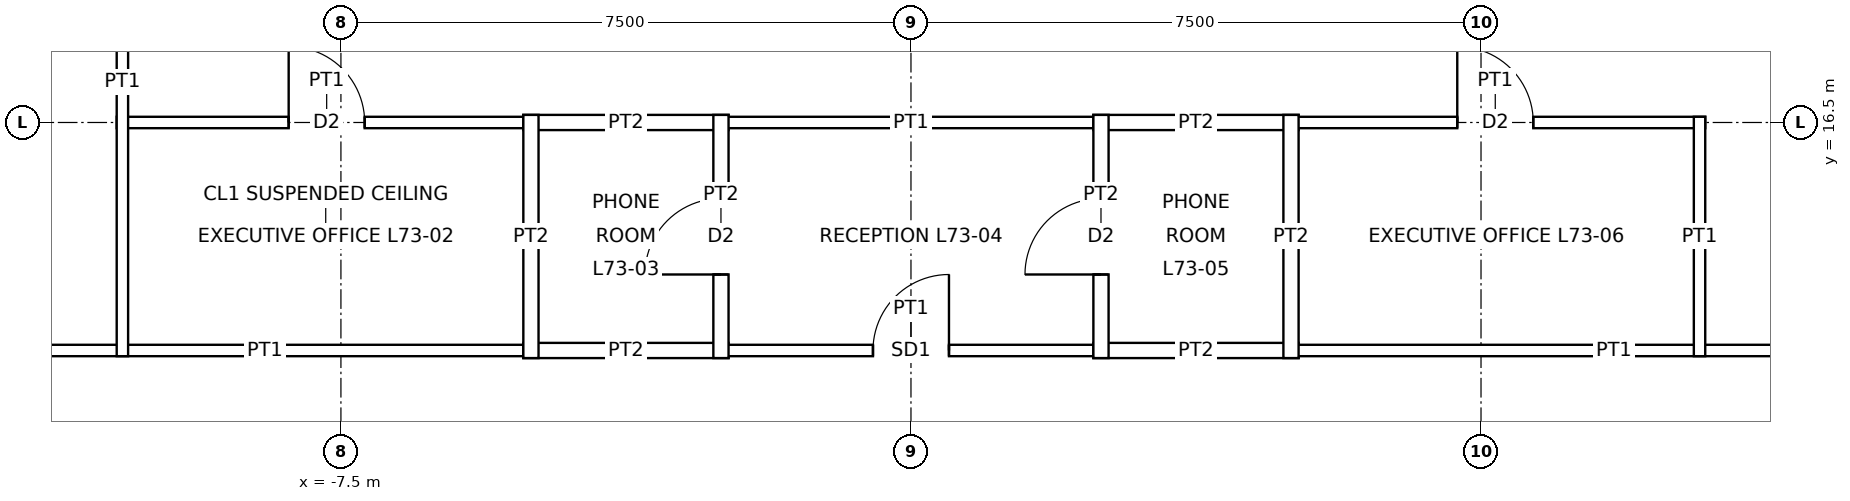
"""IFC4 building model, lengths in metres.
Left out: names, types, materials, properties, quantities, classifications, styles, units other than length and angle.
Written with IfcOpenShell. Run it as: python <this file> out.ifc"""

import sys

from ifc_helpers import new_model, si_unit, direction, frame, frame_2d, origin, place, context, subcontext, project, spatial, rectangle, extrude, element, fill, save


model = new_model("IFC4")
c1 = context("Model", 3, precision=1e-05, world=origin(), true_north=direction((0.0, 1.0)))
c2 = subcontext(c1, "Body", "Model", "MODEL_VIEW")
j1 = project(units=[si_unit("LENGTHUNIT", "METRE"), si_unit("PLANEANGLEUNIT", "RADIAN")], contexts=[c1])
p1 = place(None, origin())
s1 = spatial("IfcSite", under=j1, at=p1, CompositionType="ELEMENT")
p2 = place(p1, origin())
s2 = spatial("IfcBuilding", under=s1, at=p2, CompositionType="ELEMENT")
p3 = place(p2, frame((0.0, 0.0, 327.9)))
s3 = spatial("IfcBuildingStorey", under=s2, at=p3, CompositionType="ELEMENT", Elevation=327.9)
p4 = place(p3, frame((-12.075, 13.5, 0.0), z_axis=(0.0, 0.0, 1.0), x_axis=(1.0, 0.0, 0.0)))
e1 = element("IfcWall", 1, at=p4, inside=s3, PredefinedType="PARTITIONING", context=c2, shape_type="SweptSolid", body=[
    extrude(rectangle(XDim=7.15, YDim=0.15, at=frame_2d((3.575, 0.0))), origin(), (0.0, 0.0, 1.0), 3.85),
])
p5 = place(p3, frame((-5.1, 13.5, 0.0), z_axis=(0.0, 0.0, 1.0), x_axis=(1.0, 0.0, 0.0)))
e2 = element("IfcWall", 2, at=p5, inside=s3, PredefinedType="PARTITIONING", context=c2, shape_type="SweptSolid", body=[
    extrude(rectangle(XDim=2.7, YDim=0.2, at=frame_2d((1.35, 0.0))), origin(), (0.0, 0.0, 1.0), 3.85),
])
p6 = place(p3, frame((-2.575, 13.5, 0.0), z_axis=(0.0, 0.0, 1.0), x_axis=(1.0, 0.0, 0.0)))
e3 = element("IfcWall", 3, at=p6, inside=s3, PredefinedType="PARTITIONING", context=c2, shape_type="SweptSolid", body=[
    extrude(rectangle(XDim=5.15, YDim=0.15, at=frame_2d((2.575, 0.0))), origin(), (0.0, 0.0, 1.0), 3.85),
])
p7 = place(p6, frame((2.075, 0.0, 0.0)))
e4 = element("IfcOpeningElement", 4, at=p7, cuts=e3, PredefinedType="OPENING", context=c2, shape_type="SweptSolid", body=[
    extrude(rectangle(XDim=1.0, YDim=2.4, at=frame_2d((0.5, 1.2))), frame((0.0, 0.085, 0.0), z_axis=(0.0, -1.0, 0.0), x_axis=(1.0, 0.0, 0.0)), (0.0, 0.0, 1.0), 0.17),
])
p8 = place(p3, frame((2.4, 13.5, 0.0), z_axis=(0.0, 0.0, 1.0), x_axis=(1.0, 0.0, 0.0)))
e5 = element("IfcWall", 5, at=p8, inside=s3, PredefinedType="PARTITIONING", context=c2, shape_type="SweptSolid", body=[
    extrude(rectangle(XDim=2.7, YDim=0.2, at=frame_2d((1.35, 0.0))), origin(), (0.0, 0.0, 1.0), 3.85),
])
p9 = place(p3, frame((4.925, 13.5, 0.0), z_axis=(0.0, 0.0, 1.0), x_axis=(1.0, 0.0, 0.0)))
e6 = element("IfcWall", 6, at=p9, inside=s3, PredefinedType="PARTITIONING", context=c2, shape_type="SweptSolid", body=[
    extrude(rectangle(XDim=8.65, YDim=0.15, at=frame_2d((4.325, 0.0))), origin(), (0.0, 0.0, 1.0), 3.85),
])
p10 = place(p3, frame((-10.45, 16.5, 0.0), z_axis=(0.0, 0.0, 1.0), x_axis=(1.0, 0.0, 0.0)))
e7 = element("IfcWall", 7, at=p10, inside=s3, PredefinedType="PARTITIONING", context=c2, shape_type="SweptSolid", body=[
    extrude(rectangle(XDim=5.525, YDim=0.15, at=frame_2d((2.762, 0.0))), origin(), (0.0, 0.0, 1.0), 3.85),
])
p11 = place(p10, frame((2.262, 0.0, 0.0)))
e8 = element("IfcOpeningElement", 8, at=p11, cuts=e7, PredefinedType="OPENING", context=c2, shape_type="SweptSolid", body=[
    extrude(rectangle(XDim=1.0, YDim=2.1, at=frame_2d((0.5, 1.05))), frame((0.0, 0.085, 0.0), z_axis=(0.0, -1.0, 0.0), x_axis=(1.0, 0.0, 0.0)), (0.0, 0.0, 1.0), 0.17),
])
p12 = place(p3, frame((-5.1, 16.5, 0.0), z_axis=(0.0, 0.0, 1.0), x_axis=(1.0, 0.0, 0.0)))
e9 = element("IfcWall", 9, at=p12, inside=s3, PredefinedType="PARTITIONING", context=c2, shape_type="SweptSolid", body=[
    extrude(rectangle(XDim=2.7, YDim=0.2, at=frame_2d((1.35, 0.0))), origin(), (0.0, 0.0, 1.0), 3.85),
])
p13 = place(p3, frame((-2.575, 16.5, 0.0), z_axis=(0.0, 0.0, 1.0), x_axis=(1.0, 0.0, 0.0)))
e10 = element("IfcWall", 10, at=p13, inside=s3, PredefinedType="PARTITIONING", context=c2, shape_type="SweptSolid", body=[
    extrude(rectangle(XDim=5.15, YDim=0.15, at=frame_2d((2.575, 0.0))), origin(), (0.0, 0.0, 1.0), 3.85),
])
p14 = place(p3, frame((2.4, 16.5, 0.0), z_axis=(0.0, 0.0, 1.0), x_axis=(1.0, 0.0, 0.0)))
e11 = element("IfcWall", 11, at=p14, inside=s3, PredefinedType="PARTITIONING", context=c2, shape_type="SweptSolid", body=[
    extrude(rectangle(XDim=2.7, YDim=0.2, at=frame_2d((1.35, 0.0))), origin(), (0.0, 0.0, 1.0), 3.85),
])
p15 = place(p3, frame((4.925, 16.5, 0.0), z_axis=(0.0, 0.0, 1.0), x_axis=(1.0, 0.0, 0.0)))
e12 = element("IfcWall", 12, at=p15, inside=s3, PredefinedType="PARTITIONING", context=c2, shape_type="SweptSolid", body=[
    extrude(rectangle(XDim=5.525, YDim=0.15, at=frame_2d((2.762, 0.0))), origin(), (0.0, 0.0, 1.0), 3.85),
])
p16 = place(p15, frame((2.262, 0.0, 0.0)))
e13 = element("IfcOpeningElement", 13, at=p16, cuts=e12, PredefinedType="OPENING", context=c2, shape_type="SweptSolid", body=[
    extrude(rectangle(XDim=1.0, YDim=2.1, at=frame_2d((0.5, 1.05))), frame((0.0, 0.085, 0.0), z_axis=(0.0, -1.0, 0.0), x_axis=(1.0, 0.0, 0.0)), (0.0, 0.0, 1.0), 0.17),
])
p17 = place(p3, frame((-10.375, 13.425, 0.0), z_axis=(0.0, 0.0, 1.0), x_axis=(0.0, 1.0, 0.0)))
e14 = element("IfcWall", 14, at=p17, inside=s3, PredefinedType="PARTITIONING", context=c2, shape_type="SweptSolid", body=[
    extrude(rectangle(XDim=7.225, YDim=0.15, at=frame_2d((3.612, 0.0))), origin(), (0.0, 0.0, 1.0), 3.85),
])
p18 = place(p3, frame((-5.0, 13.4, 0.0), z_axis=(0.0, 0.0, 1.0), x_axis=(0.0, 1.0, 0.0)))
e15 = element("IfcWall", 15, at=p18, inside=s3, PredefinedType="PARTITIONING", context=c2, shape_type="SweptSolid", body=[
    extrude(rectangle(XDim=3.2, YDim=0.2, at=frame_2d((1.6, 0.0))), origin(), (0.0, 0.0, 1.0), 3.85),
])
p19 = place(p3, frame((-2.5, 13.4, 0.0), z_axis=(0.0, 0.0, 1.0), x_axis=(0.0, 1.0, 0.0)))
e16 = element("IfcWall", 16, at=p19, inside=s3, PredefinedType="PARTITIONING", context=c2, shape_type="SweptSolid", body=[
    extrude(rectangle(XDim=3.2, YDim=0.2, at=frame_2d((1.6, 0.0))), origin(), (0.0, 0.0, 1.0), 3.85),
])
p20 = place(p19, frame((1.1, 0.0, 0.0)))
e17 = element("IfcOpeningElement", 17, at=p20, cuts=e16, PredefinedType="OPENING", context=c2, shape_type="SweptSolid", body=[
    extrude(rectangle(XDim=1.0, YDim=2.1, at=frame_2d((0.5, 1.05))), frame((0.0, 0.11, 0.0), z_axis=(0.0, -1.0, 0.0), x_axis=(1.0, 0.0, 0.0)), (0.0, 0.0, 1.0), 0.22),
])
p21 = place(p3, frame((2.5, 13.4, 0.0), z_axis=(0.0, 0.0, 1.0), x_axis=(0.0, 1.0, 0.0)))
e18 = element("IfcWall", 18, at=p21, inside=s3, PredefinedType="PARTITIONING", context=c2, shape_type="SweptSolid", body=[
    extrude(rectangle(XDim=3.2, YDim=0.2, at=frame_2d((1.6, 0.0))), origin(), (0.0, 0.0, 1.0), 3.85),
])
p22 = place(p21, frame((1.1, 0.0, 0.0)))
e19 = element("IfcOpeningElement", 19, at=p22, cuts=e18, PredefinedType="OPENING", context=c2, shape_type="SweptSolid", body=[
    extrude(rectangle(XDim=1.0, YDim=2.1, at=frame_2d((0.5, 1.05))), frame((0.0, 0.11, 0.0), z_axis=(0.0, -1.0, 0.0), x_axis=(1.0, 0.0, 0.0)), (0.0, 0.0, 1.0), 0.22),
])
p23 = place(p3, frame((5.0, 13.4, 0.0), z_axis=(0.0, 0.0, 1.0), x_axis=(0.0, 1.0, 0.0)))
e20 = element("IfcWall", 20, at=p23, inside=s3, PredefinedType="PARTITIONING", context=c2, shape_type="SweptSolid", body=[
    extrude(rectangle(XDim=3.2, YDim=0.2, at=frame_2d((1.6, 0.0))), origin(), (0.0, 0.0, 1.0), 3.85),
])
p24 = place(p3, frame((10.375, 13.425, 0.0), z_axis=(0.0, 0.0, 1.0), x_axis=(0.0, 1.0, 0.0)))
e21 = element("IfcWall", 21, at=p24, inside=s3, PredefinedType="PARTITIONING", context=c2, shape_type="SweptSolid", body=[
    extrude(rectangle(XDim=3.15, YDim=0.15, at=frame_2d((1.575, 0.0))), origin(), (0.0, 0.0, 1.0), 3.85),
])
p25 = place(p11, origin())
e22 = element("IfcDoor", 22, at=p25, inside=s3, OperationType="SINGLE_SWING_LEFT", PredefinedType="DOOR", context=c2, shape_type="SweptSolid", body=[
    extrude(rectangle(XDim=1.0, YDim=2.1, at=frame_2d((0.5, 1.05))), frame((0.0, 0.025, 0.0), z_axis=(0.0, -1.0, 0.0), x_axis=(1.0, 0.0, 0.0)), (0.0, 0.0, 1.0), 0.05),
])
fill(e8, e22)
p26 = place(p20, origin())
e23 = element("IfcDoor", 23, at=p26, inside=s3, OperationType="SINGLE_SWING_LEFT", PredefinedType="DOOR", context=c2, shape_type="SweptSolid", body=[
    extrude(rectangle(XDim=1.0, YDim=2.1, at=frame_2d((0.5, 1.05))), frame((0.0, 0.025, 0.0), z_axis=(0.0, -1.0, 0.0), x_axis=(1.0, 0.0, 0.0)), (0.0, 0.0, 1.0), 0.05),
])
fill(e17, e23)
p27 = place(p7, origin())
e24 = element("IfcDoor", 24, at=p27, inside=s3, OperationType="SINGLE_SWING_RIGHT", PredefinedType="DOOR", context=c2, shape_type="SweptSolid", body=[
    extrude(rectangle(XDim=1.0, YDim=2.4, at=frame_2d((0.5, 1.2))), frame((0.0, 0.025, 0.0), z_axis=(0.0, -1.0, 0.0), x_axis=(1.0, 0.0, 0.0)), (0.0, 0.0, 1.0), 0.05),
])
fill(e4, e24)
p28 = place(p22, origin())
e25 = element("IfcDoor", 25, at=p28, inside=s3, OperationType="SINGLE_SWING_LEFT", PredefinedType="DOOR", context=c2, shape_type="SweptSolid", body=[
    extrude(rectangle(XDim=1.0, YDim=2.1, at=frame_2d((0.5, 1.05))), frame((0.0, 0.025, 0.0), z_axis=(0.0, -1.0, 0.0), x_axis=(1.0, 0.0, 0.0)), (0.0, 0.0, 1.0), 0.05),
])
fill(e19, e25)
p29 = place(p16, origin())
e26 = element("IfcDoor", 26, at=p29, inside=s3, OperationType="SINGLE_SWING_LEFT", PredefinedType="DOOR", context=c2, shape_type="SweptSolid", body=[
    extrude(rectangle(XDim=1.0, YDim=2.1, at=frame_2d((0.5, 1.05))), frame((0.0, 0.025, 0.0), z_axis=(0.0, -1.0, 0.0), x_axis=(1.0, 0.0, 0.0)), (0.0, 0.0, 1.0), 0.05),
])
fill(e13, e26)
save(model, sys.argv[1])
